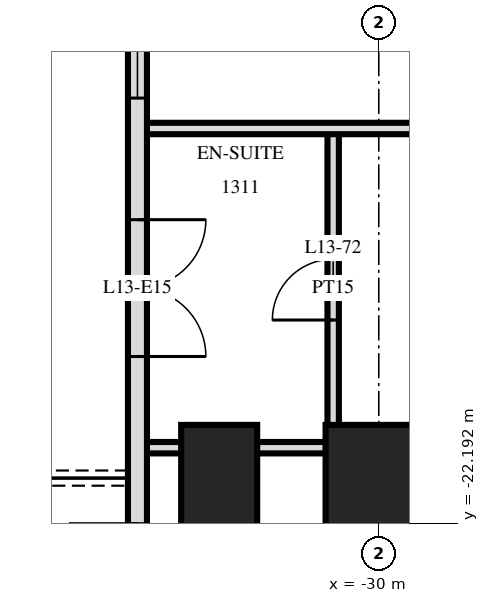
"""IFC4 building model, lengths in metres.
Left out: names, types, materials, properties, quantities, classifications, styles, units other than length and angle.
Written with IfcOpenShell. Run it as: python <this file> out.ifc"""

import sys

from ifc_helpers import new_model, si_unit, direction, frame, frame_2d, origin, origin_2d, place, context, subcontext, project, spatial, rectangle, extrude, element, fill, save


model = new_model("IFC4")
c1 = context("Model", 3, precision=1e-05, world=origin(), true_north=direction((0.0, 1.0)))
c2 = subcontext(c1, "Body", "Model", "MODEL_VIEW")
j1 = project(units=[si_unit("LENGTHUNIT", "METRE"), si_unit("PLANEANGLEUNIT", "RADIAN")], contexts=[c1])
p1 = place(None, origin())
s1 = spatial("IfcSite", under=j1, at=p1, CompositionType="ELEMENT")
p2 = place(p1, origin())
s2 = spatial("IfcBuilding", under=s1, at=p2, CompositionType="ELEMENT")
p3 = place(p2, frame((0.0, 0.0, 56.4)))
s3 = spatial("IfcBuildingStorey", under=s2, at=p3, CompositionType="ELEMENT", Elevation=56.4)
p4 = place(p3, frame((-32.1, -21.6, 0.0), z_axis=(0.0, 0.0, 1.0), x_axis=(0.0, 1.0, 0.0)))
e1 = element("IfcColumn", 1, at=p4, inside=s3, PredefinedType="COLUMN", context=c2, shape_type="SweptSolid", body=[
    extrude(rectangle(XDim=1.4, YDim=1.0, at=origin_2d()), origin(), (0.0, 0.0, 1.0), 3.6),
])
p5 = place(p3, frame((-30.0, -21.6, 0.0), z_axis=(0.0, 0.0, 1.0), x_axis=(1.0, 0.0, 0.0)))
e2 = element("IfcColumn", 2, at=p5, inside=s3, PredefinedType="COLUMN", context=c2, shape_type="SweptSolid", body=[
    extrude(rectangle(XDim=1.4, YDim=1.4, at=origin_2d()), origin(), (0.0, 0.0, 1.0), 3.6),
])
p6 = place(p3, frame((-33.175, -3.325, 0.0), z_axis=(0.0, 0.0, 1.0), x_axis=(0.0, -1.0, 0.0)))
e3 = element("IfcWall", 3, at=p6, inside=s3, PredefinedType="SOLIDWALL", context=c2, shape_type="SweptSolid", body=[
    extrude(rectangle(XDim=21.551, YDim=0.25, at=frame_2d((10.775, 0.0))), origin(), (0.0, 0.0, 1.0), 3.32),
])
p7 = place(p6, frame((7.275, 0.0, 0.0)))
e4 = element("IfcOpeningElement", 4, at=p7, cuts=e3, PredefinedType="OPENING", context=c2, shape_type="SweptSolid", body=[
    extrude(rectangle(XDim=1.8, YDim=2.4, at=frame_2d((0.9, 1.2))), frame((0.0, 0.135, 0.0), z_axis=(0.0, -1.0, 0.0), x_axis=(1.0, 0.0, 0.0)), (0.0, 0.0, 1.0), 0.27),
])
p8 = place(p6, frame((12.075, 0.0, 0.3)))
e5 = element("IfcOpeningElement", 5, at=p8, cuts=e3, PredefinedType="OPENING", context=c2, shape_type="SweptSolid", body=[
    extrude(rectangle(XDim=1.2, YDim=2.1, at=frame_2d((0.6, 1.05))), frame((0.0, 0.135, 0.0), z_axis=(0.0, -1.0, 0.0), x_axis=(1.0, 0.0, 0.0)), (0.0, 0.0, 1.0), 0.27),
])
p9 = place(p6, frame((14.875, 0.0, 0.0)))
e6 = element("IfcOpeningElement", 6, at=p9, cuts=e3, PredefinedType="OPENING", context=c2, shape_type="SweptSolid", body=[
    extrude(rectangle(XDim=1.8, YDim=2.4, at=frame_2d((0.9, 1.2))), frame((0.0, 0.135, 0.0), z_axis=(0.0, -1.0, 0.0), x_axis=(1.0, 0.0, 0.0)), (0.0, 0.0, 1.0), 0.27),
])
p10 = place(p6, frame((18.875, 0.0, 0.0)))
e7 = element("IfcOpeningElement", 7, at=p10, cuts=e3, PredefinedType="OPENING", context=c2, shape_type="SweptSolid", body=[
    extrude(rectangle(XDim=1.8, YDim=2.4, at=frame_2d((0.9, 1.2))), frame((0.0, 0.135, 0.0), z_axis=(0.0, -1.0, 0.0), x_axis=(1.0, 0.0, 0.0)), (0.0, 0.0, 1.0), 0.27),
])
p11 = place(p3, frame((-30.6, -21.2, 0.0), z_axis=(0.0, 0.0, 1.0), x_axis=(0.0, 1.0, 0.0)))
e8 = element("IfcWall", 8, at=p11, inside=s3, PredefinedType="PARTITIONING", context=c2, shape_type="SweptSolid", body=[
    extrude(rectangle(XDim=4.2, YDim=0.15, at=frame_2d((2.1, 0.0))), origin(), (0.0, 0.0, 1.0), 3.32),
])
p12 = place(p11, frame((1.68, 0.0, 0.0)))
e9 = element("IfcOpeningElement", 9, at=p12, cuts=e8, PredefinedType="OPENING", context=c2, shape_type="SweptSolid", body=[
    extrude(rectangle(XDim=0.8, YDim=2.1, at=frame_2d((0.4, 1.05))), frame((0.0, 0.085, 0.0), z_axis=(0.0, -1.0, 0.0), x_axis=(1.0, 0.0, 0.0)), (0.0, 0.0, 1.0), 0.17),
])
p13 = place(p3, frame((-33.12, -21.2, 0.0), z_axis=(0.0, 0.0, 1.0), x_axis=(1.0, 0.0, 0.0)))
e10 = element("IfcWall", 10, at=p13, inside=s3, PredefinedType="PARTITIONING", context=c2, shape_type="SweptSolid", body=[
    extrude(rectangle(XDim=2.52, YDim=0.15, at=frame_2d((1.26, 0.0))), origin(), (0.0, 0.0, 1.0), 3.32),
])
p14 = place(p3, frame((-33.12, -17.0, 0.0), z_axis=(0.0, 0.0, 1.0), x_axis=(1.0, 0.0, 0.0)))
e11 = element("IfcWall", 11, at=p14, inside=s3, PredefinedType="PARTITIONING", context=c2, shape_type="SweptSolid", body=[
    extrude(rectangle(XDim=66.24, YDim=0.15, at=frame_2d((33.12, 0.0))), origin(), (0.0, 0.0, 1.0), 3.32),
])
p15 = place(p14, frame((12.27, 0.0, 0.0)))
e12 = element("IfcOpeningElement", 12, at=p15, cuts=e11, PredefinedType="OPENING", context=c2, shape_type="SweptSolid", body=[
    extrude(rectangle(XDim=1.0, YDim=2.1, at=frame_2d((0.5, 1.05))), frame((0.0, 0.085, 0.0), z_axis=(0.0, -1.0, 0.0), x_axis=(1.0, 0.0, 0.0)), (0.0, 0.0, 1.0), 0.17),
])
p16 = place(p14, frame((16.97, 0.0, 0.0)))
e13 = element("IfcOpeningElement", 13, at=p16, cuts=e11, PredefinedType="OPENING", context=c2, shape_type="SweptSolid", body=[
    extrude(rectangle(XDim=1.0, YDim=2.1, at=frame_2d((0.5, 1.05))), frame((0.0, 0.085, 0.0), z_axis=(0.0, -1.0, 0.0), x_axis=(1.0, 0.0, 0.0)), (0.0, 0.0, 1.0), 0.17),
])
p17 = place(p14, frame((18.27, 0.0, 0.0)))
e14 = element("IfcOpeningElement", 14, at=p17, cuts=e11, PredefinedType="OPENING", context=c2, shape_type="SweptSolid", body=[
    extrude(rectangle(XDim=1.0, YDim=2.1, at=frame_2d((0.5, 1.05))), frame((0.0, 0.085, 0.0), z_axis=(0.0, -1.0, 0.0), x_axis=(1.0, 0.0, 0.0)), (0.0, 0.0, 1.0), 0.17),
])
p18 = place(p14, frame((22.97, 0.0, 0.0)))
e15 = element("IfcOpeningElement", 15, at=p18, cuts=e11, PredefinedType="OPENING", context=c2, shape_type="SweptSolid", body=[
    extrude(rectangle(XDim=1.0, YDim=2.1, at=frame_2d((0.5, 1.05))), frame((0.0, 0.085, 0.0), z_axis=(0.0, -1.0, 0.0), x_axis=(1.0, 0.0, 0.0)), (0.0, 0.0, 1.0), 0.17),
])
p19 = place(p14, frame((24.27, 0.0, 0.0)))
e16 = element("IfcOpeningElement", 16, at=p19, cuts=e11, PredefinedType="OPENING", context=c2, shape_type="SweptSolid", body=[
    extrude(rectangle(XDim=1.0, YDim=2.1, at=frame_2d((0.5, 1.05))), frame((0.0, 0.085, 0.0), z_axis=(0.0, -1.0, 0.0), x_axis=(1.0, 0.0, 0.0)), (0.0, 0.0, 1.0), 0.17),
])
p20 = place(p14, frame((28.97, 0.0, 0.0)))
e17 = element("IfcOpeningElement", 17, at=p20, cuts=e11, PredefinedType="OPENING", context=c2, shape_type="SweptSolid", body=[
    extrude(rectangle(XDim=1.0, YDim=2.1, at=frame_2d((0.5, 1.05))), frame((0.0, 0.085, 0.0), z_axis=(0.0, -1.0, 0.0), x_axis=(1.0, 0.0, 0.0)), (0.0, 0.0, 1.0), 0.17),
])
p21 = place(p14, frame((30.27, 0.0, 0.0)))
e18 = element("IfcOpeningElement", 18, at=p21, cuts=e11, PredefinedType="OPENING", context=c2, shape_type="SweptSolid", body=[
    extrude(rectangle(XDim=1.0, YDim=2.1, at=frame_2d((0.5, 1.05))), frame((0.0, 0.085, 0.0), z_axis=(0.0, -1.0, 0.0), x_axis=(1.0, 0.0, 0.0)), (0.0, 0.0, 1.0), 0.17),
])
p22 = place(p14, frame((33.82, 0.0, 0.0)))
e19 = element("IfcOpeningElement", 19, at=p22, cuts=e11, PredefinedType="OPENING", context=c2, shape_type="SweptSolid", body=[
    extrude(rectangle(XDim=1.0, YDim=2.1, at=frame_2d((0.5, 1.05))), frame((0.0, 0.085, 0.0), z_axis=(0.0, -1.0, 0.0), x_axis=(1.0, 0.0, 0.0)), (0.0, 0.0, 1.0), 0.17),
])
p23 = place(p14, frame((46.27, 0.0, 0.0)))
e20 = element("IfcOpeningElement", 20, at=p23, cuts=e11, PredefinedType="OPENING", context=c2, shape_type="SweptSolid", body=[
    extrude(rectangle(XDim=1.0, YDim=2.1, at=frame_2d((0.5, 1.05))), frame((0.0, 0.085, 0.0), z_axis=(0.0, -1.0, 0.0), x_axis=(1.0, 0.0, 0.0)), (0.0, 0.0, 1.0), 0.17),
])
p24 = place(p14, frame((52.97, 0.0, 0.0)))
e21 = element("IfcOpeningElement", 21, at=p24, cuts=e11, PredefinedType="OPENING", context=c2, shape_type="SweptSolid", body=[
    extrude(rectangle(XDim=1.0, YDim=2.1, at=frame_2d((0.5, 1.05))), frame((0.0, 0.085, 0.0), z_axis=(0.0, -1.0, 0.0), x_axis=(1.0, 0.0, 0.0)), (0.0, 0.0, 1.0), 0.17),
])
p25 = place(p14, frame((6.05, 0.0, 0.0)))
e22 = element("IfcOpeningElement", 22, at=p25, cuts=e11, PredefinedType="OPENING", context=c2, shape_type="SweptSolid", body=[
    extrude(rectangle(XDim=1.0, YDim=2.1, at=frame_2d((0.5, 1.05))), frame((0.0, 0.085, 0.0), z_axis=(0.0, -1.0, 0.0), x_axis=(1.0, 0.0, 0.0)), (0.0, 0.0, 1.0), 0.17),
])
p26 = place(p14, frame((59.15, 0.0, 0.0)))
e23 = element("IfcOpeningElement", 23, at=p26, cuts=e11, PredefinedType="OPENING", context=c2, shape_type="SweptSolid", body=[
    extrude(rectangle(XDim=1.0, YDim=2.1, at=frame_2d((0.5, 1.05))), frame((0.0, 0.085, 0.0), z_axis=(0.0, -1.0, 0.0), x_axis=(1.0, 0.0, 0.0)), (0.0, 0.0, 1.0), 0.17),
])
p27 = place(p8, origin())
e24 = element("IfcWindow", 24, at=p27, inside=s3, PartitioningType="SINGLE_PANEL", PredefinedType="WINDOW", context=c2, shape_type="SweptSolid", body=[
    extrude(rectangle(XDim=1.2, YDim=2.1, at=frame_2d((0.6, 1.05))), frame((0.0, 0.03, 0.0), z_axis=(0.0, -1.0, 0.0), x_axis=(1.0, 0.0, 0.0)), (0.0, 0.0, 1.0), 0.06),
])
fill(e5, e24)
p28 = place(p9, origin())
e25 = element("IfcDoor", 25, at=p28, inside=s3, OperationType="DOUBLE_DOOR_SINGLE_SWING", PredefinedType="DOOR", context=c2, shape_type="SweptSolid", body=[
    extrude(rectangle(XDim=1.8, YDim=2.4, at=frame_2d((0.9, 1.2))), frame((0.0, 0.025, 0.0), z_axis=(0.0, -1.0, 0.0), x_axis=(1.0, 0.0, 0.0)), (0.0, 0.0, 1.0), 0.05),
])
fill(e6, e25)
p29 = place(p12, origin())
e26 = element("IfcDoor", 26, at=p29, inside=s3, OperationType="SINGLE_SWING_RIGHT", PredefinedType="DOOR", context=c2, shape_type="SweptSolid", body=[
    extrude(rectangle(XDim=0.8, YDim=2.1, at=frame_2d((0.4, 1.05))), frame((0.0, 0.025, 0.0), z_axis=(0.0, -1.0, 0.0), x_axis=(1.0, 0.0, 0.0)), (0.0, 0.0, 1.0), 0.05),
])
fill(e9, e26)
save(model, sys.argv[1])
